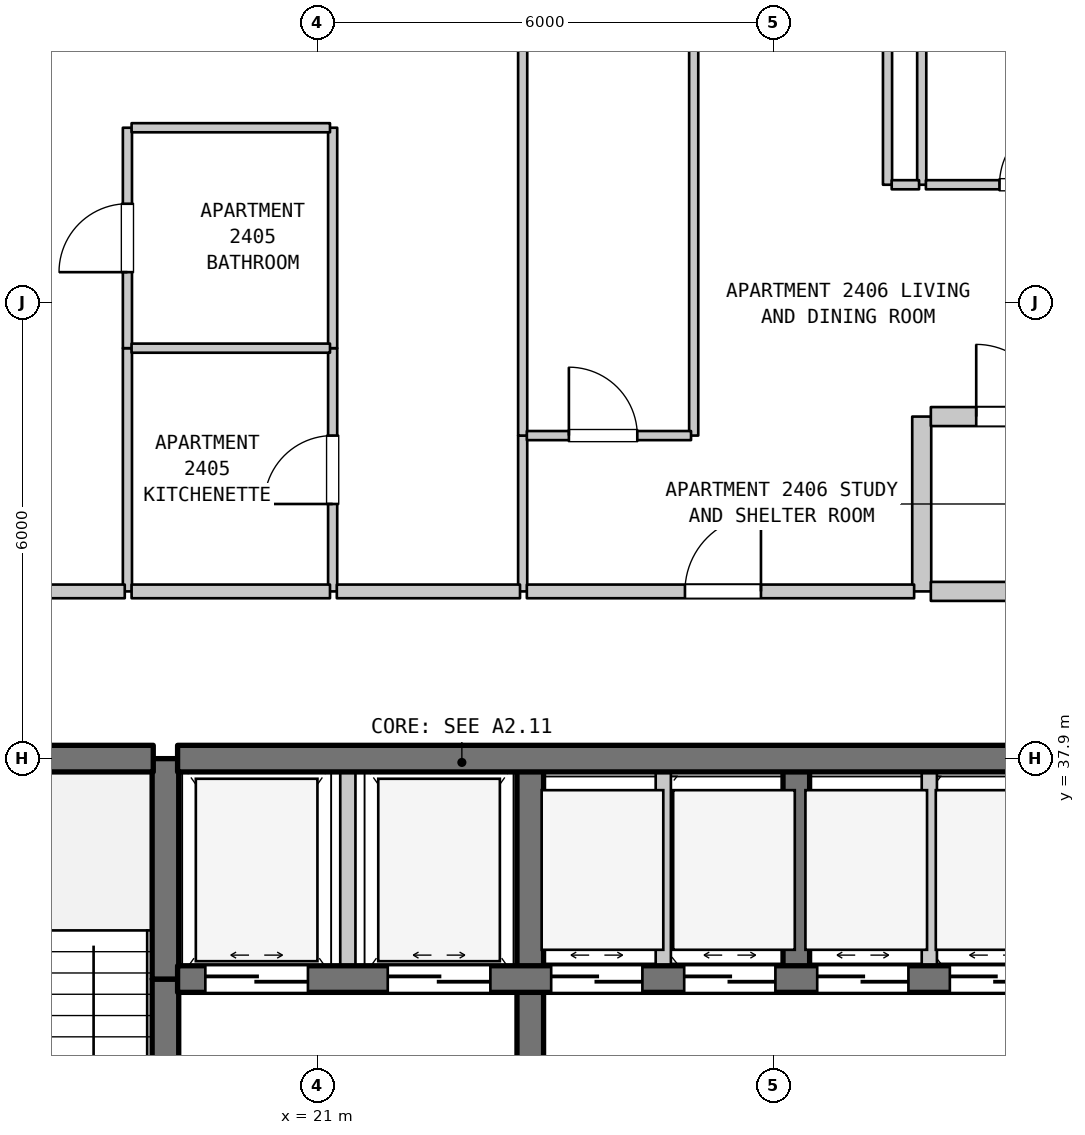
"""IFC4 building model, lengths in metres.
Left out: names, types, materials, properties, quantities, classifications, styles, units other than length and angle.
Written with IfcOpenShell. Run it as: python <this file> out.ifc"""

import sys

from ifc_helpers import new_model, si_unit, direction, frame, frame_2d, origin, place, context, subcontext, project, spatial, rectangle, extrude, element, fill, save


model = new_model("IFC4")
c1 = context("Model", 3, precision=1e-05, world=origin(), true_north=direction((0.0, 1.0)))
c2 = subcontext(c1, "Body", "Model", "MODEL_VIEW")
j1 = project(units=[si_unit("LENGTHUNIT", "METRE"), si_unit("PLANEANGLEUNIT", "RADIAN")], contexts=[c1])
p1 = place(None, origin())
s1 = spatial("IfcSite", under=j1, at=p1, CompositionType="ELEMENT")
p2 = place(p1, origin())
s2 = spatial("IfcBuilding", under=s1, at=p2, CompositionType="ELEMENT")
p3 = place(p2, frame((0.0, 0.0, 102.0)))
s3 = spatial("IfcBuildingStorey", under=s2, at=p3, CompositionType="ELEMENT", Elevation=102.0)
p4 = place(p3, frame((18.5, 40.1, 0.0), z_axis=(0.0, 0.0, 1.0), x_axis=(0.0, 1.0, 0.0)))
e1 = element("IfcWall", 1, at=p4, inside=s3, PredefinedType="PARTITIONING", context=c2, shape_type="SweptSolid", body=[
    extrude(rectangle(XDim=3.2, YDim=0.12, at=frame_2d((1.6, 0.0))), origin(), (0.0, 0.0, 1.0), 3.385),
])
p5 = place(p3, frame((18.5, 43.3, 0.0), z_axis=(0.0, 0.0, 1.0), x_axis=(0.0, 1.0, 0.0)))
e2 = element("IfcWall", 2, at=p5, inside=s3, PredefinedType="PARTITIONING", context=c2, shape_type="SweptSolid", body=[
    extrude(rectangle(XDim=2.9, YDim=0.12, at=frame_2d((1.45, 0.0))), origin(), (0.0, 0.0, 1.0), 3.385),
])
p6 = place(p5, frame((1.0, 0.0, 0.0)))
e3 = element("IfcOpeningElement", 3, at=p6, cuts=e2, PredefinedType="OPENING", context=c2, shape_type="SweptSolid", body=[
    extrude(rectangle(XDim=0.9, YDim=2.1, at=frame_2d((0.45, 1.05))), frame((0.0, 0.07, 0.0), z_axis=(0.0, -1.0, 0.0), x_axis=(1.0, 0.0, 0.0)), (0.0, 0.0, 1.0), 0.14),
])
p7 = place(p3, frame((19.0, 29.5, 0.0), z_axis=(0.0, 0.0, 1.0), x_axis=(0.0, 1.0, 0.0)))
e4 = element("IfcWall", 4, at=p7, inside=s3, PredefinedType="SHEAR", context=c2, shape_type="SweptSolid", body=[
    extrude(rectangle(XDim=5.5, YDim=0.35, at=frame_2d((2.75, 0.0))), origin(), (0.0, 0.0, 1.0), 3.385),
])
p8 = place(p7, frame((2.025, 0.0, 0.0)))
e5 = element("IfcOpeningElement", 5, at=p8, cuts=e4, PredefinedType="OPENING", context=c2, shape_type="SweptSolid", body=[
    extrude(rectangle(XDim=1.1, YDim=2.15, at=frame_2d((0.55, 1.075))), frame((0.0, 0.185, 0.0), z_axis=(0.0, -1.0, 0.0), x_axis=(1.0, 0.0, 0.0)), (0.0, 0.0, 1.0), 0.37),
])
p9 = place(p3, frame((19.0, 35.0, 0.0), z_axis=(0.0, 0.0, 1.0), x_axis=(0.0, 1.0, 0.0)))
e6 = element("IfcWall", 6, at=p9, inside=s3, PredefinedType="SHEAR", context=c2, shape_type="SweptSolid", body=[
    extrude(rectangle(XDim=2.9, YDim=0.35, at=frame_2d((1.45, 0.0))), origin(), (0.0, 0.0, 1.0), 3.385),
])
p10 = place(p3, frame((21.2, 40.1, 0.0), z_axis=(0.0, 0.0, 1.0), x_axis=(0.0, 1.0, 0.0)))
e7 = element("IfcWall", 7, at=p10, inside=s3, PredefinedType="PARTITIONING", context=c2, shape_type="SweptSolid", body=[
    extrude(rectangle(XDim=3.2, YDim=0.12, at=frame_2d((1.6, 0.0))), origin(), (0.0, 0.0, 1.0), 3.385),
])
p11 = place(p10, frame((1.15, 0.0, 0.0)))
e8 = element("IfcOpeningElement", 8, at=p11, cuts=e7, PredefinedType="OPENING", context=c2, shape_type="SweptSolid", body=[
    extrude(rectangle(XDim=0.9, YDim=2.15, at=frame_2d((0.45, 1.075))), frame((0.0, 0.07, 0.0), z_axis=(0.0, -1.0, 0.0), x_axis=(1.0, 0.0, 0.0)), (0.0, 0.0, 1.0), 0.14),
])
p12 = place(p3, frame((21.2, 43.3, 0.0), z_axis=(0.0, 0.0, 1.0), x_axis=(0.0, 1.0, 0.0)))
e9 = element("IfcWall", 9, at=p12, inside=s3, PredefinedType="PARTITIONING", context=c2, shape_type="SweptSolid", body=[
    extrude(rectangle(XDim=2.9, YDim=0.12, at=frame_2d((1.45, 0.0))), origin(), (0.0, 0.0, 1.0), 3.385),
])
p13 = place(p3, frame((21.4, 35.0, 0.0), z_axis=(0.0, 0.0, 1.0), x_axis=(0.0, 1.0, 0.0)))
e10 = element("IfcWall", 10, at=p13, inside=s3, PredefinedType="STANDARD", context=c2, shape_type="SweptSolid", body=[
    extrude(rectangle(XDim=2.9, YDim=0.2, at=frame_2d((1.45, 0.0))), origin(), (0.0, 0.0, 1.0), 3.385),
])
p14 = place(p3, frame((23.7, 40.1, 0.0), z_axis=(0.0, 0.0, 1.0), x_axis=(0.0, 1.0, 0.0)))
e11 = element("IfcWall", 11, at=p14, inside=s3, PredefinedType="PARTITIONING", context=c2, shape_type="SweptSolid", body=[
    extrude(rectangle(XDim=2.05, YDim=0.12, at=frame_2d((1.025, 0.0))), origin(), (0.0, 0.0, 1.0), 3.385),
])
p15 = place(p3, frame((23.7, 42.15, 0.0), z_axis=(0.0, 0.0, 1.0), x_axis=(0.0, 1.0, 0.0)))
e12 = element("IfcWall", 12, at=p15, inside=s3, PredefinedType="PARTITIONING", context=c2, shape_type="SweptSolid", body=[
    extrude(rectangle(XDim=11.74, YDim=0.12, at=frame_2d((5.87, 0.0))), origin(), (0.0, 0.0, 1.0), 3.385),
])
p16 = place(p3, frame((23.8, 31.5, 0.0), z_axis=(0.0, 0.0, 1.0), x_axis=(0.0, 1.0, 0.0)))
e13 = element("IfcWall", 13, at=p16, inside=s3, PredefinedType="SHEAR", context=c2, shape_type="SweptSolid", body=[
    extrude(rectangle(XDim=3.5, YDim=0.35, at=frame_2d((1.75, 0.0))), origin(), (0.0, 0.0, 1.0), 3.385),
])
p17 = place(p16, frame((1.127, 0.0, 0.0)))
e14 = element("IfcOpeningElement", 14, at=p17, cuts=e13, PredefinedType="OPENING", context=c2, shape_type="SweptSolid", body=[
    extrude(rectangle(XDim=1.1, YDim=2.15, at=frame_2d((0.55, 1.075))), frame((0.0, 0.185, 0.0), z_axis=(0.0, -1.0, 0.0), x_axis=(1.0, 0.0, 0.0)), (0.0, 0.0, 1.0), 0.37),
])
p18 = place(p3, frame((23.8, 35.0, 0.0), z_axis=(0.0, 0.0, 1.0), x_axis=(0.0, 1.0, 0.0)))
e15 = element("IfcWall", 15, at=p18, inside=s3, PredefinedType="SHEAR", context=c2, shape_type="SweptSolid", body=[
    extrude(rectangle(XDim=2.9, YDim=0.35, at=frame_2d((1.45, 0.0))), origin(), (0.0, 0.0, 1.0), 3.385),
])
p19 = place(p3, frame((25.55, 35.0, 0.0), z_axis=(0.0, 0.0, 1.0), x_axis=(0.0, 1.0, 0.0)))
e16 = element("IfcWall", 16, at=p19, inside=s3, PredefinedType="STANDARD", context=c2, shape_type="SweptSolid", body=[
    extrude(rectangle(XDim=2.9, YDim=0.2, at=frame_2d((1.45, 0.0))), origin(), (0.0, 0.0, 1.0), 3.385),
])
p20 = place(p3, frame((25.95, 42.15, 0.0), z_axis=(0.0, 0.0, 1.0), x_axis=(0.0, 1.0, 0.0)))
e17 = element("IfcWall", 17, at=p20, inside=s3, PredefinedType="PARTITIONING", context=c2, shape_type="SweptSolid", body=[
    extrude(rectangle(XDim=11.74, YDim=0.12, at=frame_2d((5.87, 0.0))), origin(), (0.0, 0.0, 1.0), 3.385),
])
p21 = place(p3, frame((27.3, 35.0, 0.0), z_axis=(0.0, 0.0, 1.0), x_axis=(0.0, 1.0, 0.0)))
e18 = element("IfcWall", 18, at=p21, inside=s3, PredefinedType="SHEAR", context=c2, shape_type="SweptSolid", body=[
    extrude(rectangle(XDim=2.9, YDim=0.35, at=frame_2d((1.45, 0.0))), origin(), (0.0, 0.0, 1.0), 3.385),
])
p22 = place(p3, frame((28.5, 45.45, 0.0), z_axis=(0.0, 0.0, 1.0), x_axis=(0.0, 1.0, 0.0)))
e19 = element("IfcWall", 19, at=p22, inside=s3, PredefinedType="PARTITIONING", context=c2, shape_type="SweptSolid", body=[
    extrude(rectangle(XDim=8.44, YDim=0.12, at=frame_2d((4.22, 0.0))), origin(), (0.0, 0.0, 1.0), 3.385),
])
p23 = place(p3, frame((28.95, 40.1, 0.0), z_axis=(0.0, 0.0, 1.0), x_axis=(0.0, 1.0, 0.0)))
e20 = element("IfcWall", 20, at=p23, inside=s3, PredefinedType="STANDARD", context=c2, shape_type="SweptSolid", body=[
    extrude(rectangle(XDim=2.3, YDim=0.25, at=frame_2d((1.15, 0.0))), origin(), (0.0, 0.0, 1.0), 3.385),
])
p24 = place(p3, frame((28.95, 45.45, 0.0), z_axis=(0.0, 0.0, 1.0), x_axis=(0.0, 1.0, 0.0)))
e21 = element("IfcWall", 21, at=p24, inside=s3, PredefinedType="PARTITIONING", context=c2, shape_type="SweptSolid", body=[
    extrude(rectangle(XDim=8.44, YDim=0.12, at=frame_2d((4.22, 0.0))), origin(), (0.0, 0.0, 1.0), 3.385),
])
p25 = place(p3, frame((29.05, 35.0, 0.0), z_axis=(0.0, 0.0, 1.0), x_axis=(0.0, 1.0, 0.0)))
e22 = element("IfcWall", 22, at=p25, inside=s3, PredefinedType="STANDARD", context=c2, shape_type="SweptSolid", body=[
    extrude(rectangle(XDim=2.9, YDim=0.2, at=frame_2d((1.45, 0.0))), origin(), (0.0, 0.0, 1.0), 3.385),
])
p26 = place(p3, frame((19.16, 35.0, 0.0), z_axis=(0.0, 0.0, 1.0), x_axis=(1.0, 0.0, 0.0)))
e23 = element("IfcWall", 23, at=p26, inside=s3, PredefinedType="SHEAR", context=c2, shape_type="SweptSolid", body=[
    extrude(rectangle(XDim=11.48, YDim=0.35, at=frame_2d((5.74, 0.0))), origin(), (0.0, 0.0, 1.0), 3.385),
])
p27 = place(p26, frame((0.365, 0.0, 0.0)))
e24 = element("IfcOpeningElement", 24, at=p27, cuts=e23, PredefinedType="OPENING", context=c2, shape_type="SweptSolid", body=[
    extrude(rectangle(XDim=1.35, YDim=2.2, at=frame_2d((0.675, 1.1))), frame((0.0, 0.185, 0.0), z_axis=(0.0, -1.0, 0.0), x_axis=(1.0, 0.0, 0.0)), (0.0, 0.0, 1.0), 0.37),
])
p28 = place(p26, frame((2.765, 0.0, 0.0)))
e25 = element("IfcOpeningElement", 25, at=p28, cuts=e23, PredefinedType="OPENING", context=c2, shape_type="SweptSolid", body=[
    extrude(rectangle(XDim=1.35, YDim=2.2, at=frame_2d((0.675, 1.1))), frame((0.0, 0.185, 0.0), z_axis=(0.0, -1.0, 0.0), x_axis=(1.0, 0.0, 0.0)), (0.0, 0.0, 1.0), 0.37),
])
p29 = place(p26, frame((4.915, 0.0, 0.0)))
e26 = element("IfcOpeningElement", 26, at=p29, cuts=e23, PredefinedType="OPENING", context=c2, shape_type="SweptSolid", body=[
    extrude(rectangle(XDim=1.2, YDim=2.2, at=frame_2d((0.6, 1.1))), frame((0.0, 0.185, 0.0), z_axis=(0.0, -1.0, 0.0), x_axis=(1.0, 0.0, 0.0)), (0.0, 0.0, 1.0), 0.37),
])
p30 = place(p26, frame((6.665, 0.0, 0.0)))
e27 = element("IfcOpeningElement", 27, at=p30, cuts=e23, PredefinedType="OPENING", context=c2, shape_type="SweptSolid", body=[
    extrude(rectangle(XDim=1.2, YDim=2.2, at=frame_2d((0.6, 1.1))), frame((0.0, 0.185, 0.0), z_axis=(0.0, -1.0, 0.0), x_axis=(1.0, 0.0, 0.0)), (0.0, 0.0, 1.0), 0.37),
])
p31 = place(p26, frame((8.415, 0.0, 0.0)))
e28 = element("IfcOpeningElement", 28, at=p31, cuts=e23, PredefinedType="OPENING", context=c2, shape_type="SweptSolid", body=[
    extrude(rectangle(XDim=1.2, YDim=2.2, at=frame_2d((0.6, 1.1))), frame((0.0, 0.185, 0.0), z_axis=(0.0, -1.0, 0.0), x_axis=(1.0, 0.0, 0.0)), (0.0, 0.0, 1.0), 0.37),
])
p32 = place(p26, frame((10.16, 0.0, 0.0)))
e29 = element("IfcOpeningElement", 29, at=p32, cuts=e23, PredefinedType="OPENING", context=c2, shape_type="SweptSolid", body=[
    extrude(rectangle(XDim=1.2, YDim=2.2, at=frame_2d((0.6, 1.1))), frame((0.0, 0.185, 0.0), z_axis=(0.0, -1.0, 0.0), x_axis=(1.0, 0.0, 0.0)), (0.0, 0.0, 1.0), 0.37),
])
p33 = place(p3, frame((15.16, 37.9, 0.0), z_axis=(0.0, 0.0, 1.0), x_axis=(1.0, 0.0, 0.0)))
e30 = element("IfcWall", 30, at=p33, inside=s3, PredefinedType="SHEAR", context=c2, shape_type="SweptSolid", body=[
    extrude(rectangle(XDim=3.68, YDim=0.35, at=frame_2d((1.84, 0.0))), origin(), (0.0, 0.0, 1.0), 3.385),
])
p34 = place(p3, frame((19.16, 37.9, 0.0), z_axis=(0.0, 0.0, 1.0), x_axis=(1.0, 0.0, 0.0)))
e31 = element("IfcWall", 31, at=p34, inside=s3, PredefinedType="SHEAR", context=c2, shape_type="SweptSolid", body=[
    extrude(rectangle(XDim=11.48, YDim=0.35, at=frame_2d((5.74, 0.0))), origin(), (0.0, 0.0, 1.0), 3.385),
])
p35 = place(p3, frame((12.875, 40.1, 0.0), z_axis=(0.0, 0.0, 1.0), x_axis=(1.0, 0.0, 0.0)))
e32 = element("IfcWall", 32, at=p35, inside=s3, PredefinedType="STANDARD", context=c2, shape_type="SweptSolid", body=[
    extrude(rectangle(XDim=5.59, YDim=0.18, at=frame_2d((2.795, 0.0))), origin(), (0.0, 0.0, 1.0), 3.385),
])
p36 = place(p35, frame((2.28, 0.0, 0.0)))
e33 = element("IfcOpeningElement", 33, at=p36, cuts=e32, PredefinedType="OPENING", context=c2, shape_type="SweptSolid", body=[
    extrude(rectangle(XDim=1.0, YDim=2.15, at=frame_2d((0.5, 1.075))), frame((0.0, 0.1, 0.0), z_axis=(0.0, -1.0, 0.0), x_axis=(1.0, 0.0, 0.0)), (0.0, 0.0, 1.0), 0.2),
])
p37 = place(p3, frame((18.555, 40.1, 0.0), z_axis=(0.0, 0.0, 1.0), x_axis=(1.0, 0.0, 0.0)))
e34 = element("IfcWall", 34, at=p37, inside=s3, PredefinedType="STANDARD", context=c2, shape_type="SweptSolid", body=[
    extrude(rectangle(XDim=2.61, YDim=0.18, at=frame_2d((1.305, 0.0))), origin(), (0.0, 0.0, 1.0), 3.385),
])
p38 = place(p3, frame((21.255, 40.1, 0.0), z_axis=(0.0, 0.0, 1.0), x_axis=(1.0, 0.0, 0.0)))
e35 = element("IfcWall", 35, at=p38, inside=s3, PredefinedType="STANDARD", context=c2, shape_type="SweptSolid", body=[
    extrude(rectangle(XDim=2.41, YDim=0.18, at=frame_2d((1.205, 0.0))), origin(), (0.0, 0.0, 1.0), 3.385),
])
p39 = place(p3, frame((23.755, 40.1, 0.0), z_axis=(0.0, 0.0, 1.0), x_axis=(1.0, 0.0, 0.0)))
e36 = element("IfcWall", 36, at=p39, inside=s3, PredefinedType="STANDARD", context=c2, shape_type="SweptSolid", body=[
    extrude(rectangle(XDim=5.095, YDim=0.18, at=frame_2d((2.548, 0.0))), origin(), (0.0, 0.0, 1.0), 3.385),
])
p40 = place(p39, frame((2.08, 0.0, 0.0)))
e37 = element("IfcOpeningElement", 37, at=p40, cuts=e36, PredefinedType="OPENING", context=c2, shape_type="SweptSolid", body=[
    extrude(rectangle(XDim=1.0, YDim=2.15, at=frame_2d((0.5, 1.075))), frame((0.0, 0.1, 0.0), z_axis=(0.0, -1.0, 0.0), x_axis=(1.0, 0.0, 0.0)), (0.0, 0.0, 1.0), 0.2),
])
p41 = place(p3, frame((29.07, 40.1, 0.0), z_axis=(0.0, 0.0, 1.0), x_axis=(1.0, 0.0, 0.0)))
e38 = element("IfcWall", 38, at=p41, inside=s3, PredefinedType="STANDARD", context=c2, shape_type="SweptSolid", body=[
    extrude(rectangle(XDim=2.143, YDim=0.25, at=frame_2d((1.071, 0.0))), origin(), (0.0, 0.0, 1.0), 3.385),
])
p42 = place(p3, frame((23.755, 42.15, 0.0), z_axis=(0.0, 0.0, 1.0), x_axis=(1.0, 0.0, 0.0)))
e39 = element("IfcWall", 39, at=p42, inside=s3, PredefinedType="PARTITIONING", context=c2, shape_type="SweptSolid", body=[
    extrude(rectangle(XDim=2.16, YDim=0.12, at=frame_2d((1.08, 0.0))), origin(), (0.0, 0.0, 1.0), 3.385),
])
p43 = place(p42, frame((0.553, 0.0, 0.0)))
e40 = element("IfcOpeningElement", 40, at=p43, cuts=e39, PredefinedType="OPENING", context=c2, shape_type="SweptSolid", body=[
    extrude(rectangle(XDim=0.9, YDim=2.15, at=frame_2d((0.45, 1.075))), frame((0.0, 0.07, 0.0), z_axis=(0.0, -1.0, 0.0), x_axis=(1.0, 0.0, 0.0)), (0.0, 0.0, 1.0), 0.14),
])
p44 = place(p3, frame((29.07, 42.4, 0.0), z_axis=(0.0, 0.0, 1.0), x_axis=(1.0, 0.0, 0.0)))
e41 = element("IfcWall", 41, at=p44, inside=s3, PredefinedType="STANDARD", context=c2, shape_type="SweptSolid", body=[
    extrude(rectangle(XDim=2.143, YDim=0.25, at=frame_2d((1.071, 0.0))), origin(), (0.0, 0.0, 1.0), 3.385),
])
p45 = place(p44, frame((0.597, 0.0, 0.0)))
e42 = element("IfcOpeningElement", 42, at=p45, cuts=e41, PredefinedType="OPENING", context=c2, shape_type="SweptSolid", body=[
    extrude(rectangle(XDim=0.95, YDim=2.15, at=frame_2d((0.475, 1.075))), frame((0.0, 0.135, 0.0), z_axis=(0.0, -1.0, 0.0), x_axis=(1.0, 0.0, 0.0)), (0.0, 0.0, 1.0), 0.27),
])
p46 = place(p3, frame((18.555, 43.3, 0.0), z_axis=(0.0, 0.0, 1.0), x_axis=(1.0, 0.0, 0.0)))
e43 = element("IfcWall", 43, at=p46, inside=s3, PredefinedType="PARTITIONING", context=c2, shape_type="SweptSolid", body=[
    extrude(rectangle(XDim=2.61, YDim=0.12, at=frame_2d((1.305, 0.0))), origin(), (0.0, 0.0, 1.0), 3.385),
])
p47 = place(p3, frame((28.555, 45.45, 0.0), z_axis=(0.0, 0.0, 1.0), x_axis=(1.0, 0.0, 0.0)))
e44 = element("IfcWall", 44, at=p47, inside=s3, PredefinedType="PARTITIONING", context=c2, shape_type="SweptSolid", body=[
    extrude(rectangle(XDim=0.36, YDim=0.12, at=frame_2d((0.18, 0.0))), origin(), (0.0, 0.0, 1.0), 3.385),
])
p48 = place(p3, frame((29.005, 45.45, 0.0), z_axis=(0.0, 0.0, 1.0), x_axis=(1.0, 0.0, 0.0)))
e45 = element("IfcWall", 45, at=p48, inside=s3, PredefinedType="PARTITIONING", context=c2, shape_type="SweptSolid", body=[
    extrude(rectangle(XDim=8.06, YDim=0.12, at=frame_2d((4.03, 0.0))), origin(), (0.0, 0.0, 1.0), 3.385),
])
p49 = place(p48, frame((0.968, 0.0, 0.0)))
e46 = element("IfcOpeningElement", 46, at=p49, cuts=e45, PredefinedType="OPENING", context=c2, shape_type="SweptSolid", body=[
    extrude(rectangle(XDim=0.9, YDim=2.15, at=frame_2d((0.45, 1.075))), frame((0.0, 0.07, 0.0), z_axis=(0.0, -1.0, 0.0), x_axis=(1.0, 0.0, 0.0)), (0.0, 0.0, 1.0), 0.14),
])
p50 = place(p48, frame((3.507, 0.0, 0.0)))
e47 = element("IfcOpeningElement", 47, at=p50, cuts=e45, PredefinedType="OPENING", context=c2, shape_type="SweptSolid", body=[
    extrude(rectangle(XDim=0.9, YDim=2.15, at=frame_2d((0.45, 1.075))), frame((0.0, 0.07, 0.0), z_axis=(0.0, -1.0, 0.0), x_axis=(1.0, 0.0, 0.0)), (0.0, 0.0, 1.0), 0.14),
])
p51 = place(p48, frame((6.051, 0.0, 0.0)))
e48 = element("IfcOpeningElement", 48, at=p51, cuts=e45, PredefinedType="OPENING", context=c2, shape_type="SweptSolid", body=[
    extrude(rectangle(XDim=0.9, YDim=2.15, at=frame_2d((0.45, 1.075))), frame((0.0, 0.07, 0.0), z_axis=(0.0, -1.0, 0.0), x_axis=(1.0, 0.0, 0.0)), (0.0, 0.0, 1.0), 0.14),
])
p52 = place(p3, frame((18.555, 46.2, 0.0), z_axis=(0.0, 0.0, 1.0), x_axis=(1.0, 0.0, 0.0)))
e49 = element("IfcWall", 49, at=p52, inside=s3, PredefinedType="PARTITIONING", context=c2, shape_type="SweptSolid", body=[
    extrude(rectangle(XDim=2.61, YDim=0.12, at=frame_2d((1.305, 0.0))), origin(), (0.0, 0.0, 1.0), 3.385),
])
p53 = place(p6, origin())
e50 = element("IfcDoor", 50, at=p53, inside=s3, OperationType="SINGLE_SWING_LEFT", PredefinedType="DOOR", context=c2, shape_type="SweptSolid", body=[
    extrude(rectangle(XDim=0.9, YDim=2.1, at=frame_2d((0.45, 1.05))), frame((0.0, 0.025, 0.0), z_axis=(0.0, -1.0, 0.0), x_axis=(1.0, 0.0, 0.0)), (0.0, 0.0, 1.0), 0.05),
])
fill(e3, e50)
p54 = place(p11, origin())
e51 = element("IfcDoor", 51, at=p54, inside=s3, OperationType="SINGLE_SWING_LEFT", PredefinedType="DOOR", context=c2, shape_type="SweptSolid", body=[
    extrude(rectangle(XDim=0.9, YDim=2.15, at=frame_2d((0.45, 1.075))), frame((0.0, 0.025, 0.0), z_axis=(0.0, -1.0, 0.0), x_axis=(1.0, 0.0, 0.0)), (0.0, 0.0, 1.0), 0.05),
])
fill(e8, e51)
p55 = place(p27, origin())
e52 = element("IfcDoor", 52, at=p55, inside=s3, OperationType="DOUBLE_DOOR_SLIDING", PredefinedType="DOOR", context=c2, shape_type="SweptSolid", body=[
    extrude(rectangle(XDim=1.35, YDim=2.2, at=frame_2d((0.675, 1.1))), frame((0.0, 0.025, 0.0), z_axis=(0.0, -1.0, 0.0), x_axis=(1.0, 0.0, 0.0)), (0.0, 0.0, 1.0), 0.05),
])
fill(e24, e52)
p56 = place(p28, origin())
e53 = element("IfcDoor", 53, at=p56, inside=s3, OperationType="DOUBLE_DOOR_SLIDING", PredefinedType="DOOR", context=c2, shape_type="SweptSolid", body=[
    extrude(rectangle(XDim=1.35, YDim=2.2, at=frame_2d((0.675, 1.1))), frame((0.0, 0.025, 0.0), z_axis=(0.0, -1.0, 0.0), x_axis=(1.0, 0.0, 0.0)), (0.0, 0.0, 1.0), 0.05),
])
fill(e25, e53)
p57 = place(p29, origin())
e54 = element("IfcDoor", 54, at=p57, inside=s3, OperationType="DOUBLE_DOOR_SLIDING", PredefinedType="DOOR", context=c2, shape_type="SweptSolid", body=[
    extrude(rectangle(XDim=1.2, YDim=2.2, at=frame_2d((0.6, 1.1))), frame((0.0, 0.025, 0.0), z_axis=(0.0, -1.0, 0.0), x_axis=(1.0, 0.0, 0.0)), (0.0, 0.0, 1.0), 0.05),
])
fill(e26, e54)
p58 = place(p30, origin())
e55 = element("IfcDoor", 55, at=p58, inside=s3, OperationType="DOUBLE_DOOR_SLIDING", PredefinedType="DOOR", context=c2, shape_type="SweptSolid", body=[
    extrude(rectangle(XDim=1.2, YDim=2.2, at=frame_2d((0.6, 1.1))), frame((0.0, 0.025, 0.0), z_axis=(0.0, -1.0, 0.0), x_axis=(1.0, 0.0, 0.0)), (0.0, 0.0, 1.0), 0.05),
])
fill(e27, e55)
p59 = place(p31, origin())
e56 = element("IfcDoor", 56, at=p59, inside=s3, OperationType="DOUBLE_DOOR_SLIDING", PredefinedType="DOOR", context=c2, shape_type="SweptSolid", body=[
    extrude(rectangle(XDim=1.2, YDim=2.2, at=frame_2d((0.6, 1.1))), frame((0.0, 0.025, 0.0), z_axis=(0.0, -1.0, 0.0), x_axis=(1.0, 0.0, 0.0)), (0.0, 0.0, 1.0), 0.05),
])
fill(e28, e56)
p60 = place(p32, origin())
e57 = element("IfcDoor", 57, at=p60, inside=s3, OperationType="DOUBLE_DOOR_SLIDING", PredefinedType="DOOR", context=c2, shape_type="SweptSolid", body=[
    extrude(rectangle(XDim=1.2, YDim=2.2, at=frame_2d((0.6, 1.1))), frame((0.0, 0.025, 0.0), z_axis=(0.0, -1.0, 0.0), x_axis=(1.0, 0.0, 0.0)), (0.0, 0.0, 1.0), 0.05),
])
fill(e29, e57)
p61 = place(p40, origin())
e58 = element("IfcDoor", 58, at=p61, inside=s3, OperationType="SINGLE_SWING_RIGHT", PredefinedType="DOOR", context=c2, shape_type="SweptSolid", body=[
    extrude(rectangle(XDim=1.0, YDim=2.15, at=frame_2d((0.5, 1.075))), frame((0.0, 0.025, 0.0), z_axis=(0.0, -1.0, 0.0), x_axis=(1.0, 0.0, 0.0)), (0.0, 0.0, 1.0), 0.05),
])
fill(e37, e58)
p62 = place(p43, origin())
e59 = element("IfcDoor", 59, at=p62, inside=s3, OperationType="SINGLE_SWING_LEFT", PredefinedType="DOOR", context=c2, shape_type="SweptSolid", body=[
    extrude(rectangle(XDim=0.9, YDim=2.15, at=frame_2d((0.45, 1.075))), frame((0.0, 0.025, 0.0), z_axis=(0.0, -1.0, 0.0), x_axis=(1.0, 0.0, 0.0)), (0.0, 0.0, 1.0), 0.05),
])
fill(e40, e59)
p63 = place(p45, origin())
e60 = element("IfcDoor", 60, at=p63, inside=s3, OperationType="SINGLE_SWING_LEFT", PredefinedType="DOOR", context=c2, shape_type="SweptSolid", body=[
    extrude(rectangle(XDim=0.95, YDim=2.15, at=frame_2d((0.475, 1.075))), frame((0.0, 0.025, 0.0), z_axis=(0.0, -1.0, 0.0), x_axis=(1.0, 0.0, 0.0)), (0.0, 0.0, 1.0), 0.05),
])
fill(e42, e60)
p64 = place(p49, origin())
e61 = element("IfcDoor", 61, at=p64, inside=s3, OperationType="SINGLE_SWING_RIGHT", PredefinedType="DOOR", context=c2, shape_type="SweptSolid", body=[
    extrude(rectangle(XDim=0.9, YDim=2.15, at=frame_2d((0.45, 1.075))), frame((0.0, 0.025, 0.0), z_axis=(0.0, -1.0, 0.0), x_axis=(1.0, 0.0, 0.0)), (0.0, 0.0, 1.0), 0.05),
])
fill(e46, e61)
save(model, sys.argv[1])
